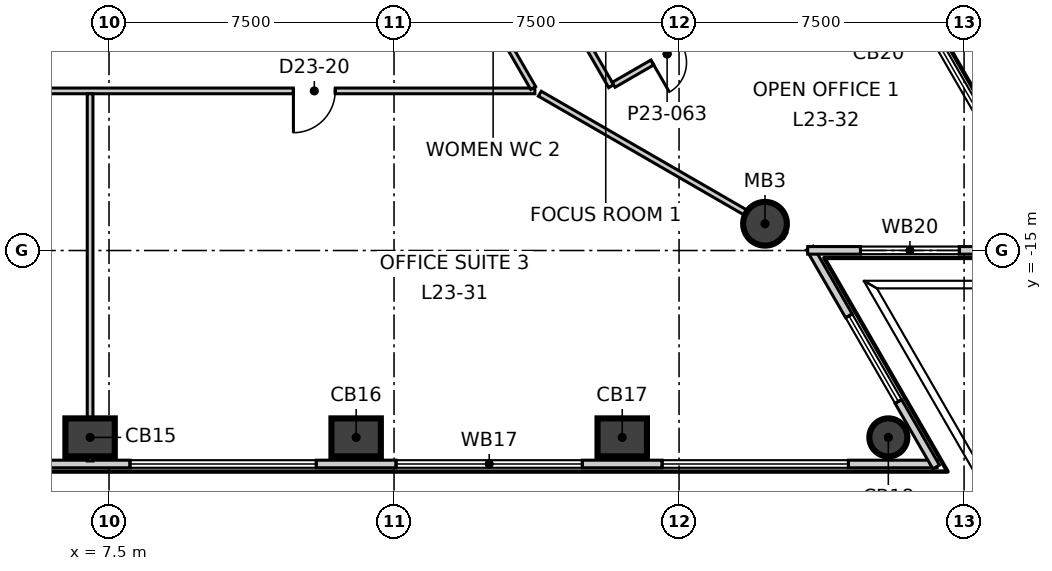
"""IFC4 building model, lengths in metres.
Left out: names, types, materials, properties, quantities, classifications, styles, units other than length and angle.
Written with IfcOpenShell. Run it as: python <this file> out.ifc"""

import sys

from ifc_helpers import new_model, si_unit, direction, frame, frame_2d, origin, origin_2d, place, context, subcontext, project, spatial, rectangle, circle, extrude, element, fill, save


model = new_model("IFC4")
c1 = context("Model", 3, precision=1e-05, world=origin(), true_north=direction((0.0, 1.0)))
c2 = subcontext(c1, "Body", "Model", "MODEL_VIEW")
j1 = project(units=[si_unit("LENGTHUNIT", "METRE"), si_unit("PLANEANGLEUNIT", "RADIAN")], contexts=[c1])
p1 = place(None, origin())
s1 = spatial("IfcSite", under=j1, at=p1, CompositionType="ELEMENT")
p2 = place(p1, origin())
s2 = spatial("IfcBuilding", under=s1, at=p2, CompositionType="ELEMENT")
p3 = place(p2, frame((0.0, 0.0, 104.3)))
s3 = spatial("IfcBuildingStorey", under=s2, at=p3, CompositionType="ELEMENT", Elevation=104.3)
for number, where, z_axis, x_axis in (
    (1, (7.002, -19.917, -0.3), (0.0, 0.0, 1.0), (1.0, 0.0, 0.0)),
    (2, (14.003, -19.917, -0.3), (0.0, 0.0, 1.0), (1.0, 0.0, 0.0)),
    (3, (21.005, -19.917, -0.3), (0.0, 0.0, 1.0), (1.0, 0.0, 0.0)),
):
    element("IfcColumn", number, at=place(p3, frame(where, z_axis=z_axis, x_axis=x_axis)), inside=s3, PredefinedType="COLUMN", context=c2, shape_type="SweptSolid", body=[
        extrude(rectangle(XDim=1.3, YDim=1.0, at=origin_2d()), origin(), (0.0, 0.0, 1.0), 4.0),
    ])
p4 = place(p3, frame((28.007, -19.917, -0.3), z_axis=(0.0, 0.0, 1.0), x_axis=(1.0, 0.0, 0.0)))
e4 = element("IfcColumn", 4, at=p4, inside=s3, PredefinedType="COLUMN", context=c2, shape_type="SweptSolid", body=[
    extrude(circle(Radius=0.5, at=origin_2d()), origin(), (0.0, 0.0, 1.0), 4.0),
])
p5 = place(p3, frame((24.762, -14.296, -0.3), z_axis=(0.0, 0.0, 1.0), x_axis=(1.0, 0.0, 0.0)))
e5 = element("IfcColumn", 5, at=p5, inside=s3, PredefinedType="COLUMN", context=c2, shape_type="SweptSolid", body=[
    extrude(circle(Radius=0.575, at=origin_2d()), origin(), (0.0, 0.0, 1.0), 4.0),
])
p6 = place(p3, frame((-29.31, -20.617, 0.0), z_axis=(0.0, 0.0, 1.0), x_axis=(1.0, 0.0, 0.0)))
e6 = element("IfcWall", 6, at=p6, inside=s3, PredefinedType="ELEMENTEDWALL", context=c2, shape_type="SweptSolid", body=[
    extrude(rectangle(XDim=58.6, YDim=0.2, at=frame_2d((29.3, 0.0))), origin(), (0.0, 0.0, 1.0), 3.7),
])
p7 = place(p6, frame((2.354, 0.0, 0.9)))
e7 = element("IfcOpeningElement", 7, at=p7, cuts=e6, PredefinedType="OPENING", context=c2, shape_type="SweptSolid", body=[
    extrude(rectangle(XDim=4.9, YDim=2.5, at=frame_2d((2.45, 1.25))), frame((0.0, 0.11, 0.0), z_axis=(0.0, -1.0, 0.0), x_axis=(1.0, 0.0, 0.0)), (0.0, 0.0, 1.0), 0.22),
])
p8 = place(p6, frame((9.356, 0.0, 0.9)))
e8 = element("IfcOpeningElement", 8, at=p8, cuts=e6, PredefinedType="OPENING", context=c2, shape_type="SweptSolid", body=[
    extrude(rectangle(XDim=4.9, YDim=2.5, at=frame_2d((2.45, 1.25))), frame((0.0, 0.11, 0.0), z_axis=(0.0, -1.0, 0.0), x_axis=(1.0, 0.0, 0.0)), (0.0, 0.0, 1.0), 0.22),
])
p9 = place(p6, frame((16.357, 0.0, 0.9)))
e9 = element("IfcOpeningElement", 9, at=p9, cuts=e6, PredefinedType="OPENING", context=c2, shape_type="SweptSolid", body=[
    extrude(rectangle(XDim=4.9, YDim=2.5, at=frame_2d((2.45, 1.25))), frame((0.0, 0.11, 0.0), z_axis=(0.0, -1.0, 0.0), x_axis=(1.0, 0.0, 0.0)), (0.0, 0.0, 1.0), 0.22),
])
p10 = place(p6, frame((23.359, 0.0, 0.9)))
e10 = element("IfcOpeningElement", 10, at=p10, cuts=e6, PredefinedType="OPENING", context=c2, shape_type="SweptSolid", body=[
    extrude(rectangle(XDim=4.9, YDim=2.5, at=frame_2d((2.45, 1.25))), frame((0.0, 0.11, 0.0), z_axis=(0.0, -1.0, 0.0), x_axis=(1.0, 0.0, 0.0)), (0.0, 0.0, 1.0), 0.22),
])
p11 = place(p6, frame((30.361, 0.0, 0.9)))
e11 = element("IfcOpeningElement", 11, at=p11, cuts=e6, PredefinedType="OPENING", context=c2, shape_type="SweptSolid", body=[
    extrude(rectangle(XDim=4.9, YDim=2.5, at=frame_2d((2.45, 1.25))), frame((0.0, 0.11, 0.0), z_axis=(0.0, -1.0, 0.0), x_axis=(1.0, 0.0, 0.0)), (0.0, 0.0, 1.0), 0.22),
])
p12 = place(p6, frame((37.363, 0.0, 0.9)))
e12 = element("IfcOpeningElement", 12, at=p12, cuts=e6, PredefinedType="OPENING", context=c2, shape_type="SweptSolid", body=[
    extrude(rectangle(XDim=4.9, YDim=2.5, at=frame_2d((2.45, 1.25))), frame((0.0, 0.11, 0.0), z_axis=(0.0, -1.0, 0.0), x_axis=(1.0, 0.0, 0.0)), (0.0, 0.0, 1.0), 0.22),
])
p13 = place(p6, frame((44.364, 0.0, 0.9)))
e13 = element("IfcOpeningElement", 13, at=p13, cuts=e6, PredefinedType="OPENING", context=c2, shape_type="SweptSolid", body=[
    extrude(rectangle(XDim=4.9, YDim=2.5, at=frame_2d((2.45, 1.25))), frame((0.0, 0.11, 0.0), z_axis=(0.0, -1.0, 0.0), x_axis=(1.0, 0.0, 0.0)), (0.0, 0.0, 1.0), 0.22),
])
p14 = place(p6, frame((51.366, 0.0, 0.9)))
e14 = element("IfcOpeningElement", 14, at=p14, cuts=e6, PredefinedType="OPENING", context=c2, shape_type="SweptSolid", body=[
    extrude(rectangle(XDim=4.9, YDim=2.5, at=frame_2d((2.45, 1.25))), frame((0.0, 0.11, 0.0), z_axis=(0.0, -1.0, 0.0), x_axis=(1.0, 0.0, 0.0)), (0.0, 0.0, 1.0), 0.22),
])
p15 = place(p3, frame((29.265, -20.695, 0.0), z_axis=(0.0, 0.0, 1.0), x_axis=(-0.499933237632, 0.866063945624, 0.0)))
e15 = element("IfcWall", 15, at=p15, inside=s3, PredefinedType="ELEMENTEDWALL", context=c2, shape_type="SweptSolid", body=[
    extrude(rectangle(XDim=6.651, YDim=0.2, at=frame_2d((3.325, 0.0))), origin(), (0.0, 0.0, 1.0), 3.7),
])
p16 = place(p15, frame((1.99, 0.0, 0.9)))
e16 = element("IfcOpeningElement", 16, at=p16, cuts=e15, PredefinedType="OPENING", context=c2, shape_type="SweptSolid", body=[
    extrude(rectangle(XDim=2.6, YDim=2.5, at=frame_2d((1.3, 1.25))), frame((0.0, 0.11, 0.0), z_axis=(0.0, -1.0, 0.0), x_axis=(1.0, 0.0, 0.0)), (0.0, 0.0, 1.0), 0.22),
])
p17 = place(p3, frame((25.885, -14.996, 0.0), z_axis=(0.0, 0.0, 1.0), x_axis=(1.0, 0.0, 0.0)))
e17 = element("IfcWall", 17, at=p17, inside=s3, PredefinedType="ELEMENTEDWALL", context=c2, shape_type="SweptSolid", body=[
    extrude(rectangle(XDim=6.65, YDim=0.2, at=frame_2d((3.325, 0.0))), origin(), (0.0, 0.0, 1.0), 3.7),
])
p18 = place(p17, frame((1.39, 0.0, 0.9)))
e18 = element("IfcOpeningElement", 18, at=p18, cuts=e17, PredefinedType="OPENING", context=c2, shape_type="SweptSolid", body=[
    extrude(rectangle(XDim=2.6, YDim=2.5, at=frame_2d((1.3, 1.25))), frame((0.0, 0.11, 0.0), z_axis=(0.0, -1.0, 0.0), x_axis=(1.0, 0.0, 0.0)), (0.0, 0.0, 1.0), 0.22),
])
p19 = place(p3, frame((32.51, -15.074, 0.0), z_axis=(0.0, 0.0, 1.0), x_axis=(-0.500008323105, 0.866020598384, 0.0)))
e19 = element("IfcWall", 19, at=p19, inside=s3, PredefinedType="ELEMENTEDWALL", context=c2, shape_type="SweptSolid", body=[
    extrude(rectangle(XDim=58.599, YDim=0.2, at=frame_2d((29.3, 0.0))), origin(), (0.0, 0.0, 1.0), 3.7),
])
p20 = place(p19, frame((2.354, 0.0, 0.9)))
e20 = element("IfcOpeningElement", 20, at=p20, cuts=e19, PredefinedType="OPENING", context=c2, shape_type="SweptSolid", body=[
    extrude(rectangle(XDim=4.9, YDim=2.5, at=frame_2d((2.45, 1.25))), frame((0.0, 0.11, 0.0), z_axis=(0.0, -1.0, 0.0), x_axis=(1.0, 0.0, 0.0)), (0.0, 0.0, 1.0), 0.22),
])
p21 = place(p19, frame((9.355, 0.0, 0.9)))
e21 = element("IfcOpeningElement", 21, at=p21, cuts=e19, PredefinedType="OPENING", context=c2, shape_type="SweptSolid", body=[
    extrude(rectangle(XDim=4.9, YDim=2.5, at=frame_2d((2.45, 1.25))), frame((0.0, 0.11, 0.0), z_axis=(0.0, -1.0, 0.0), x_axis=(1.0, 0.0, 0.0)), (0.0, 0.0, 1.0), 0.22),
])
p22 = place(p19, frame((16.357, 0.0, 0.9)))
e22 = element("IfcOpeningElement", 22, at=p22, cuts=e19, PredefinedType="OPENING", context=c2, shape_type="SweptSolid", body=[
    extrude(rectangle(XDim=4.9, YDim=2.5, at=frame_2d((2.45, 1.25))), frame((0.0, 0.11, 0.0), z_axis=(0.0, -1.0, 0.0), x_axis=(1.0, 0.0, 0.0)), (0.0, 0.0, 1.0), 0.22),
])
p23 = place(p19, frame((23.359, 0.0, 0.9)))
e23 = element("IfcOpeningElement", 23, at=p23, cuts=e19, PredefinedType="OPENING", context=c2, shape_type="SweptSolid", body=[
    extrude(rectangle(XDim=4.9, YDim=2.5, at=frame_2d((2.45, 1.25))), frame((0.0, 0.11, 0.0), z_axis=(0.0, -1.0, 0.0), x_axis=(1.0, 0.0, 0.0)), (0.0, 0.0, 1.0), 0.22),
])
p24 = place(p19, frame((30.36, 0.0, 0.9)))
e24 = element("IfcOpeningElement", 24, at=p24, cuts=e19, PredefinedType="OPENING", context=c2, shape_type="SweptSolid", body=[
    extrude(rectangle(XDim=4.9, YDim=2.5, at=frame_2d((2.45, 1.25))), frame((0.0, 0.11, 0.0), z_axis=(0.0, -1.0, 0.0), x_axis=(1.0, 0.0, 0.0)), (0.0, 0.0, 1.0), 0.22),
])
p25 = place(p19, frame((37.362, 0.0, 0.9)))
e25 = element("IfcOpeningElement", 25, at=p25, cuts=e19, PredefinedType="OPENING", context=c2, shape_type="SweptSolid", body=[
    extrude(rectangle(XDim=4.9, YDim=2.5, at=frame_2d((2.45, 1.25))), frame((0.0, 0.11, 0.0), z_axis=(0.0, -1.0, 0.0), x_axis=(1.0, 0.0, 0.0)), (0.0, 0.0, 1.0), 0.22),
])
p26 = place(p19, frame((44.364, 0.0, 0.9)))
e26 = element("IfcOpeningElement", 26, at=p26, cuts=e19, PredefinedType="OPENING", context=c2, shape_type="SweptSolid", body=[
    extrude(rectangle(XDim=4.9, YDim=2.5, at=frame_2d((2.45, 1.25))), frame((0.0, 0.11, 0.0), z_axis=(0.0, -1.0, 0.0), x_axis=(1.0, 0.0, 0.0)), (0.0, 0.0, 1.0), 0.22),
])
p27 = place(p19, frame((51.365, 0.0, 0.9)))
e27 = element("IfcOpeningElement", 27, at=p27, cuts=e19, PredefinedType="OPENING", context=c2, shape_type="SweptSolid", body=[
    extrude(rectangle(XDim=4.9, YDim=2.5, at=frame_2d((2.45, 1.25))), frame((0.0, 0.11, 0.0), z_axis=(0.0, -1.0, 0.0), x_axis=(1.0, 0.0, 0.0)), (0.0, 0.0, 1.0), 0.22),
])
p28 = place(p3, frame((-6.101, -10.8, 0.0), z_axis=(0.0, 0.0, 1.0), x_axis=(1.0, 0.0, 0.0)))
e28 = element("IfcWall", 28, at=p28, inside=s3, PredefinedType="PARTITIONING", context=c2, shape_type="SweptSolid", body=[
    extrude(rectangle(XDim=24.807, YDim=0.15, at=frame_2d((12.404, 0.0))), origin(), (0.0, 0.0, 1.0), 3.7),
])
p29 = place(p28, frame((10.449, 0.0, 0.0)))
e29 = element("IfcOpeningElement", 29, at=p29, cuts=e28, PredefinedType="OPENING", context=c2, shape_type="SweptSolid", body=[
    extrude(rectangle(XDim=1.1, YDim=2.1, at=frame_2d((0.55, 1.05))), frame((0.0, 0.085, 0.0), z_axis=(0.0, -1.0, 0.0), x_axis=(1.0, 0.0, 0.0)), (0.0, 0.0, 1.0), 0.17),
])
p30 = place(p28, frame((4.349, 0.0, 0.0)))
e30 = element("IfcOpeningElement", 30, at=p30, cuts=e28, PredefinedType="OPENING", context=c2, shape_type="SweptSolid", body=[
    extrude(rectangle(XDim=0.9, YDim=2.1, at=frame_2d((0.45, 1.05))), frame((0.0, 0.085, 0.0), z_axis=(0.0, -1.0, 0.0), x_axis=(1.0, 0.0, 0.0)), (0.0, 0.0, 1.0), 0.17),
])
p31 = place(p28, frame((7.149, 0.0, 0.0)))
e31 = element("IfcOpeningElement", 31, at=p31, cuts=e28, PredefinedType="OPENING", context=c2, shape_type="SweptSolid", body=[
    extrude(rectangle(XDim=1.0, YDim=2.1, at=frame_2d((0.5, 1.05))), frame((0.0, 0.085, 0.0), z_axis=(0.0, -1.0, 0.0), x_axis=(1.0, 0.0, 0.0)), (0.0, 0.0, 1.0), 0.17),
])
p32 = place(p28, frame((18.453, 0.0, 0.0)))
e32 = element("IfcOpeningElement", 32, at=p32, cuts=e28, PredefinedType="OPENING", context=c2, shape_type="SweptSolid", body=[
    extrude(rectangle(XDim=1.1, YDim=2.1, at=frame_2d((0.55, 1.05))), frame((0.0, 0.085, 0.0), z_axis=(0.0, -1.0, 0.0), x_axis=(1.0, 0.0, 0.0)), (0.0, 0.0, 1.0), 0.17),
])
p33 = place(p3, frame((9.804, 4.62, 0.0), z_axis=(0.0, 0.0, 1.0), x_axis=(0.49996419592, -0.866046074293, 0.0)))
e33 = element("IfcWall", 33, at=p33, inside=s3, PredefinedType="PARTITIONING", context=c2, shape_type="SweptSolid", body=[
    extrude(rectangle(XDim=17.718, YDim=0.15, at=frame_2d((8.859, 0.0))), origin(), (0.0, 0.0, 1.0), 3.7),
])
p34 = place(p33, frame((14.854, 0.0, 0.0)))
e34 = element("IfcOpeningElement", 34, at=p34, cuts=e33, PredefinedType="OPENING", context=c2, shape_type="SweptSolid", body=[
    extrude(rectangle(XDim=1.1, YDim=2.1, at=frame_2d((0.55, 1.05))), frame((0.0, 0.085, 0.0), z_axis=(0.0, -1.0, 0.0), x_axis=(1.0, 0.0, 0.0)), (0.0, 0.0, 1.0), 0.17),
])
p35 = place(p33, frame((1.552, 0.0, 0.0)))
e35 = element("IfcOpeningElement", 35, at=p35, cuts=e33, PredefinedType="OPENING", context=c2, shape_type="SweptSolid", body=[
    extrude(rectangle(XDim=1.1, YDim=2.1, at=frame_2d((0.55, 1.05))), frame((0.0, 0.085, 0.0), z_axis=(0.0, -1.0, 0.0), x_axis=(1.0, 0.0, 0.0)), (0.0, 0.0, 1.0), 0.17),
])
p36 = place(p33, frame((11.052, 0.0, 0.0)))
e36 = element("IfcOpeningElement", 36, at=p36, cuts=e33, PredefinedType="OPENING", context=c2, shape_type="SweptSolid", body=[
    extrude(rectangle(XDim=0.9, YDim=2.1, at=frame_2d((0.45, 1.05))), frame((0.0, 0.085, 0.0), z_axis=(0.0, -1.0, 0.0), x_axis=(1.0, 0.0, 0.0)), (0.0, 0.0, 1.0), 0.17),
])
p37 = place(p33, frame((7.852, 0.0, 0.0)))
e37 = element("IfcOpeningElement", 37, at=p37, cuts=e33, PredefinedType="OPENING", context=c2, shape_type="SweptSolid", body=[
    extrude(rectangle(XDim=0.9, YDim=2.1, at=frame_2d((0.45, 1.05))), frame((0.0, 0.085, 0.0), z_axis=(0.0, -1.0, 0.0), x_axis=(1.0, 0.0, 0.0)), (0.0, 0.0, 1.0), 0.17),
])
p38 = place(p33, frame((5.052, 0.0, 0.0)))
e38 = element("IfcOpeningElement", 38, at=p38, cuts=e33, PredefinedType="OPENING", context=c2, shape_type="SweptSolid", body=[
    extrude(rectangle(XDim=1.0, YDim=2.1, at=frame_2d((0.5, 1.05))), frame((0.0, 0.085, 0.0), z_axis=(0.0, -1.0, 0.0), x_axis=(1.0, 0.0, 0.0)), (0.0, 0.0, 1.0), 0.17),
])
p39 = place(p3, frame((7.002, -20.537, 0.0), z_axis=(0.0, 0.0, 1.0), x_axis=(0.0, 1.0, 0.0)))
e39 = element("IfcWall", 39, at=p39, inside=s3, PredefinedType="PARTITIONING", context=c2, shape_type="SweptSolid", body=[
    extrude(rectangle(XDim=9.662, YDim=0.15, at=frame_2d((4.831, 0.0))), origin(), (0.0, 0.0, 1.0), 3.7),
])
p40 = place(p3, frame((18.836, -10.874, 0.0), z_axis=(0.0, 0.0, 1.0), x_axis=(0.865999816151, -0.500044316462, 0.0)))
e40 = element("IfcWall", 40, at=p40, inside=s3, PredefinedType="PARTITIONING", context=c2, shape_type="SweptSolid", body=[
    extrude(rectangle(XDim=7.463, YDim=0.15, at=frame_2d((3.731, 0.0))), origin(), (0.0, 0.0, 1.0), 3.15),
])
p41 = place(p3, frame((17.951, -5.892, 0.0), z_axis=(0.0, 0.0, 1.0), x_axis=(0.500083244257, -0.865977337356, 0.0)))
e41 = element("IfcWall", 41, at=p41, inside=s3, PredefinedType="PARTITIONING", context=c2, shape_type="SweptSolid", body=[
    extrude(rectangle(XDim=5.525, YDim=0.15, at=frame_2d((2.763, 0.0))), origin(), (0.0, 0.0, 1.0), 3.7),
])
p42 = place(p41, frame((0.875, 0.0, 0.0)))
e42 = element("IfcOpeningElement", 42, at=p42, cuts=e41, PredefinedType="OPENING", context=c2, shape_type="SweptSolid", body=[
    extrude(rectangle(XDim=0.9, YDim=2.1, at=frame_2d((0.45, 1.05))), frame((0.0, 0.085, 0.0), z_axis=(0.0, -1.0, 0.0), x_axis=(1.0, 0.0, 0.0)), (0.0, 0.0, 1.0), 0.17),
])
p43 = place(p3, frame((20.779, -10.64, 0.0), z_axis=(0.0, 0.0, 1.0), x_axis=(0.865977875238, 0.500082312822, 0.0)))
e43 = element("IfcWall", 43, at=p43, inside=s3, PredefinedType="PARTITIONING", context=c2, shape_type="SweptSolid", body=[
    extrude(rectangle(XDim=3.25, YDim=0.15, at=frame_2d((1.625, 0.0))), origin(), (0.0, 0.0, 1.0), 3.7),
])
p44 = place(p43, frame((1.175, 0.0, 0.0)))
e44 = element("IfcOpeningElement", 44, at=p44, cuts=e43, PredefinedType="OPENING", context=c2, shape_type="SweptSolid", body=[
    extrude(rectangle(XDim=0.9, YDim=2.1, at=frame_2d((0.45, 1.05))), frame((0.0, 0.085, 0.0), z_axis=(0.0, -1.0, 0.0), x_axis=(1.0, 0.0, 0.0)), (0.0, 0.0, 1.0), 0.17),
])
p45 = place(p12, origin())
e45 = element("IfcWindow", 45, at=p45, inside=s3, PartitioningType="SINGLE_PANEL", PredefinedType="WINDOW", context=c2, shape_type="SweptSolid", body=[
    extrude(rectangle(XDim=4.9, YDim=2.5, at=frame_2d((2.45, 1.25))), frame((0.0, 0.03, 0.0), z_axis=(0.0, -1.0, 0.0), x_axis=(1.0, 0.0, 0.0)), (0.0, 0.0, 1.0), 0.06),
])
fill(e12, e45)
p46 = place(p13, origin())
e46 = element("IfcWindow", 46, at=p46, inside=s3, PartitioningType="SINGLE_PANEL", PredefinedType="WINDOW", context=c2, shape_type="SweptSolid", body=[
    extrude(rectangle(XDim=4.9, YDim=2.5, at=frame_2d((2.45, 1.25))), frame((0.0, 0.03, 0.0), z_axis=(0.0, -1.0, 0.0), x_axis=(1.0, 0.0, 0.0)), (0.0, 0.0, 1.0), 0.06),
])
fill(e13, e46)
p47 = place(p14, origin())
e47 = element("IfcWindow", 47, at=p47, inside=s3, PartitioningType="SINGLE_PANEL", PredefinedType="WINDOW", context=c2, shape_type="SweptSolid", body=[
    extrude(rectangle(XDim=4.9, YDim=2.5, at=frame_2d((2.45, 1.25))), frame((0.0, 0.03, 0.0), z_axis=(0.0, -1.0, 0.0), x_axis=(1.0, 0.0, 0.0)), (0.0, 0.0, 1.0), 0.06),
])
fill(e14, e47)
p48 = place(p16, origin())
e48 = element("IfcWindow", 48, at=p48, inside=s3, PartitioningType="SINGLE_PANEL", PredefinedType="WINDOW", context=c2, shape_type="SweptSolid", body=[
    extrude(rectangle(XDim=2.6, YDim=2.5, at=frame_2d((1.3, 1.25))), frame((0.0, 0.03, 0.0), z_axis=(0.0, -1.0, 0.0), x_axis=(1.0, 0.0, 0.0)), (0.0, 0.0, 1.0), 0.06),
])
fill(e16, e48)
p49 = place(p18, origin())
e49 = element("IfcWindow", 49, at=p49, inside=s3, PartitioningType="SINGLE_PANEL", PredefinedType="WINDOW", context=c2, shape_type="SweptSolid", body=[
    extrude(rectangle(XDim=2.6, YDim=2.5, at=frame_2d((1.3, 1.25))), frame((0.0, 0.03, 0.0), z_axis=(0.0, -1.0, 0.0), x_axis=(1.0, 0.0, 0.0)), (0.0, 0.0, 1.0), 0.06),
])
fill(e18, e49)
p50 = place(p20, origin())
e50 = element("IfcWindow", 50, at=p50, inside=s3, PartitioningType="SINGLE_PANEL", PredefinedType="WINDOW", context=c2, shape_type="SweptSolid", body=[
    extrude(rectangle(XDim=4.9, YDim=2.5, at=frame_2d((2.45, 1.25))), frame((0.0, 0.03, 0.0), z_axis=(0.0, -1.0, 0.0), x_axis=(1.0, 0.0, 0.0)), (0.0, 0.0, 1.0), 0.06),
])
fill(e20, e50)
p51 = place(p32, origin())
e51 = element("IfcDoor", 51, at=p51, inside=s3, OperationType="SINGLE_SWING_LEFT", PredefinedType="DOOR", context=c2, shape_type="SweptSolid", body=[
    extrude(rectangle(XDim=1.1, YDim=2.1, at=frame_2d((0.55, 1.05))), frame((0.0, 0.025, 0.0), z_axis=(0.0, -1.0, 0.0), x_axis=(1.0, 0.0, 0.0)), (0.0, 0.0, 1.0), 0.05),
])
fill(e32, e51)
p52 = place(p44, origin())
e52 = element("IfcDoor", 52, at=p52, inside=s3, OperationType="SINGLE_SWING_LEFT", PredefinedType="DOOR", context=c2, shape_type="SweptSolid", body=[
    extrude(rectangle(XDim=0.9, YDim=2.1, at=frame_2d((0.45, 1.05))), frame((0.0, 0.025, 0.0), z_axis=(0.0, -1.0, 0.0), x_axis=(1.0, 0.0, 0.0)), (0.0, 0.0, 1.0), 0.05),
])
fill(e44, e52)
save(model, sys.argv[1])
